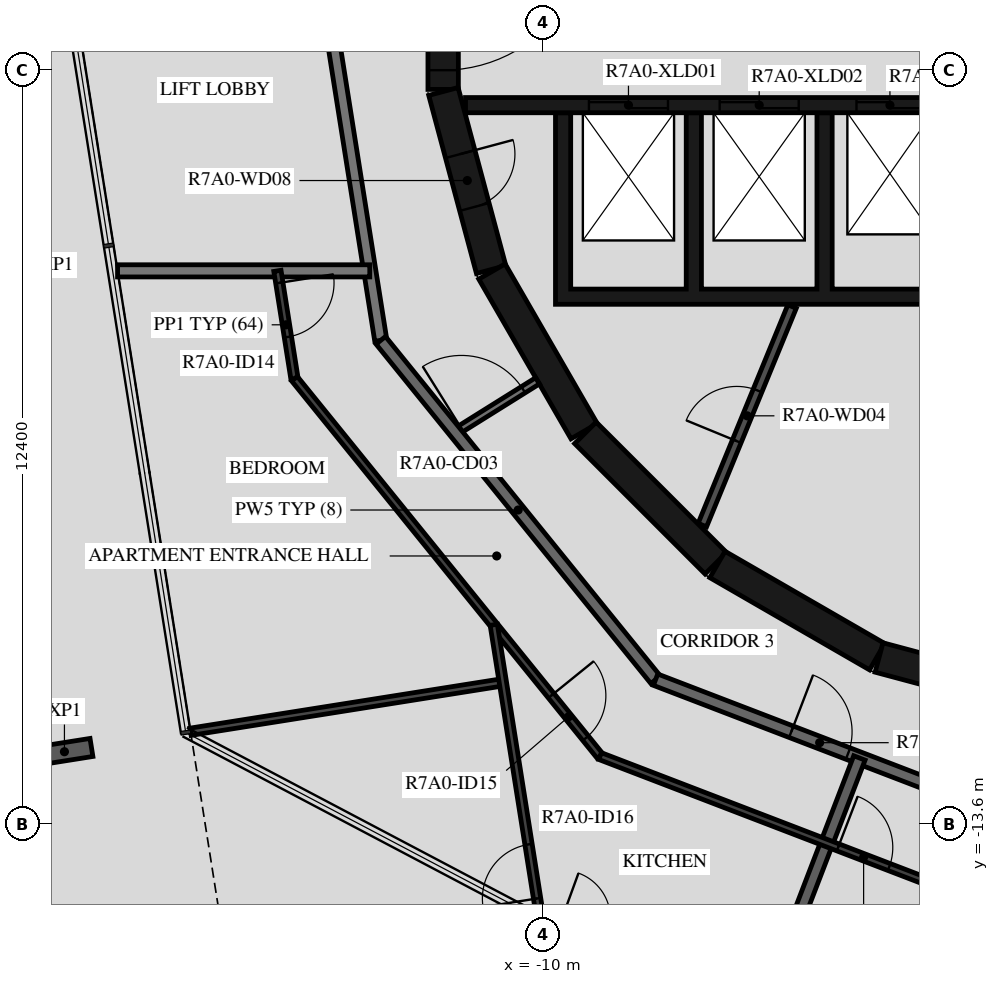
"""IFC4 building model, lengths in metres.
Left out: names, types, materials, properties, quantities, classifications, styles, units other than length and angle.
Written with IfcOpenShell. Run it as: python <this file> out.ifc"""

import sys

from ifc_helpers import new_model, si_unit, direction, frame, frame_2d, origin, origin_2d, place, context, subcontext, project, spatial, polyline, rectangle, i_section, outline, extrude, element, fill, save


model = new_model("IFC4")
c1 = context("Model", 3, precision=1e-05, world=origin(), true_north=direction((0.0, 1.0)))
c2 = subcontext(c1, "Body", "Model", "MODEL_VIEW")
j1 = project(units=[si_unit("LENGTHUNIT", "METRE"), si_unit("PLANEANGLEUNIT", "RADIAN")], contexts=[c1])
p1 = place(None, origin())
s1 = spatial("IfcSite", under=j1, at=p1, CompositionType="ELEMENT")
p2 = place(p1, origin())
s2 = spatial("IfcBuilding", under=s1, at=p2, CompositionType="ELEMENT")
p3 = place(p2, frame((0.0, 0.0, 263.4)))
s3 = spatial("IfcBuildingStorey", under=s2, at=p3, CompositionType="ELEMENT", Elevation=263.4)
p4 = place(p3, frame((-17.875, -12.408, -0.45), z_axis=(0.0, 0.0, 1.0), x_axis=(-0.156434064006, 0.987688404113, 0.0)))
e1 = element("IfcColumn", 1, at=p4, inside=s3, PredefinedType="COLUMN", context=c2, shape_type="SweptSolid", body=[
    extrude(i_section(OverallWidth=0.3, OverallDepth=0.9, WebThickness=0.019, FlangeThickness=0.035, FilletRadius=0.03, at=origin_2d()), origin(), (0.0, 0.0, 1.0), 3.57),
])
p5 = place(p3, frame((24.757, -7.212, 0.03), z_axis=(0.0, 0.0, 1.0), x_axis=(-0.843392095095, -0.537298589177, 0.0)))
e2 = element("IfcWall", 2, at=p5, inside=s3, PredefinedType="PARAPET", context=c2, shape_type="SweptSolid", body=[
    extrude(rectangle(XDim=34.009, YDim=0.2, at=frame_2d((17.004, 0.0))), origin(), (0.0, 0.0, 1.0), 1.5),
])
p6 = place(p3, frame((-11.647, 1.516, 0.0), z_axis=(0.0, 0.0, 1.0), x_axis=(0.0, -1.0, 0.0)))
e3 = element("IfcWall", 3, at=p6, inside=s3, PredefinedType="SHEAR", context=c2, shape_type="SweptSolid", body=[
    extrude(rectangle(XDim=3.033, YDim=0.5, at=frame_2d((1.516, 0.0))), origin(), (0.0, 0.0, 1.0), 3.12),
])
p7 = place(p6, frame((0.316, 0.0, 0.0)))
e4 = element("IfcOpeningElement", 4, at=p7, cuts=e3, PredefinedType="OPENING", context=c2, shape_type="SweptSolid", body=[
    extrude(rectangle(XDim=2.4, YDim=2.1, at=frame_2d((1.2, 1.05))), frame((0.0, 0.26, 0.0), z_axis=(0.0, -1.0, 0.0), x_axis=(1.0, 0.0, 0.0)), (0.0, 0.0, 1.0), 0.52),
])
p8 = place(p3, frame((-11.643, -1.55, 0.0), z_axis=(0.0, 0.0, 1.0), x_axis=(0.258734743916, -0.965948410781, 0.0)))
e5 = element("IfcWall", 5, at=p8, inside=s3, PredefinedType="SHEAR", context=c2, shape_type="SweptSolid", body=[
    extrude(rectangle(XDim=3.033, YDim=0.5, at=frame_2d((1.516, 0.0))), origin(), (0.0, 0.0, 1.0), 3.12),
])
p9 = place(p8, frame((1.066, 0.0, 0.0)))
e6 = element("IfcOpeningElement", 6, at=p9, cuts=e5, PredefinedType="OPENING", context=c2, shape_type="SweptSolid", body=[
    extrude(rectangle(XDim=0.9, YDim=2.1, at=frame_2d((0.45, 1.05))), frame((0.0, 0.26, 0.0), z_axis=(0.0, -1.0, 0.0), x_axis=(1.0, 0.0, 0.0)), (0.0, 0.0, 1.0), 0.52),
])
p10 = place(p3, frame((-10.845, -4.51, 0.0), z_axis=(0.0, 0.0, 1.0), x_axis=(0.500087131594, -0.865975092491, 0.0)))
e7 = element("IfcWall", 7, at=p10, inside=s3, PredefinedType="SHEAR", context=c2, shape_type="SweptSolid", body=[
    extrude(rectangle(XDim=3.033, YDim=0.5, at=frame_2d((1.516, 0.0))), origin(), (0.0, 0.0, 1.0), 3.12),
])
p11 = place(p3, frame((-9.308, -7.164, 0.0), z_axis=(0.0, 0.0, 1.0), x_axis=(0.707106781187, -0.707106781187, 0.0)))
e8 = element("IfcWall", 8, at=p11, inside=s3, PredefinedType="SHEAR", context=c2, shape_type="SweptSolid", body=[
    extrude(rectangle(XDim=3.032, YDim=0.5, at=frame_2d((1.516, 0.0))), origin(), (0.0, 0.0, 1.0), 3.12),
])
for number, where, z_axis, x_axis in (
    (9, (-7.137, -9.329, 0.0), (0.0, 0.0, 1.0), (0.866, -0.5, 0.0)),
    (10, (-4.479, -10.858, 0.0), (0.0, 0.0, 1.0), (0.966, -0.259, 0.0)),
):
    element("IfcWall", number, at=place(p3, frame(where, z_axis=z_axis, x_axis=x_axis)), inside=s3, PredefinedType="SHEAR", context=c2, shape_type="SweptSolid", body=[
        extrude(rectangle(XDim=3.033, YDim=0.5, at=frame_2d((1.516, 0.0))), origin(), (0.0, 0.0, 1.0), 3.12),
    ])
p12 = place(p3, origin())
e11 = element("IfcWall", 11, at=p12, inside=s3, PredefinedType="SHEAR", context=c2, shape_type="SweptSolid", body=[
    extrude(outline(polyline([(9.8, -5.05), (9.8, -4.8), (9.8, -1.9), (9.55, -1.9), (9.55, -4.8), (7.65, -4.8), (7.65, -1.9), (7.4, -1.9), (7.4, -4.8), (5.5, -4.8), (5.5, -1.9), (5.25, -1.9), (5.25, -4.8), (3.35, -4.8), (3.35, -1.9), (3.1, -1.9), (3.1, -4.8), (1.2, -4.8), (1.2, -1.9), (0.95, -1.9), (0.95, -4.8), (-0.95, -4.8), (-0.95, -1.9), (-1.2, -1.9), (-1.2, -4.8), (-3.1, -4.8), (-3.1, -1.9), (-3.35, -1.9), (-3.35, -4.8), (-5.25, -4.8), (-5.25, -1.9), (-5.5, -1.9), (-5.5, -4.8), (-7.4, -4.8), (-7.4, -1.9), (-7.65, -1.9), (-7.65, -4.8), (-9.55, -4.8), (-9.55, -1.9), (-9.8, -1.9), (-9.8, -4.8), (-9.8, -5.05), (9.8, -5.05)])), origin(), (0.0, 0.0, 1.0), 3.12),
])
p13 = place(p3, frame((-11.28, -1.775, 0.0), z_axis=(0.0, 0.0, 1.0), x_axis=(1.0, 0.0, 0.0)))
e12 = element("IfcWall", 12, at=p13, inside=s3, PredefinedType="SHEAR", context=c2, shape_type="SweptSolid", body=[
    extrude(rectangle(XDim=14.38, YDim=0.25, at=frame_2d((7.19, 0.0))), origin(), (0.0, 0.0, 1.0), 3.12),
])
p14 = place(p13, frame((2.03, 0.0, 0.0)))
e13 = element("IfcOpeningElement", 13, at=p14, cuts=e12, PredefinedType="OPENING", context=c2, shape_type="SweptSolid", body=[
    extrude(rectangle(XDim=1.3, YDim=2.1, at=frame_2d((0.65, 1.05))), frame((0.0, 0.135, 0.0), z_axis=(0.0, -1.0, 0.0), x_axis=(1.0, 0.0, 0.0)), (0.0, 0.0, 1.0), 0.27),
])
p15 = place(p13, frame((4.18, 0.0, 0.0)))
e14 = element("IfcOpeningElement", 14, at=p15, cuts=e12, PredefinedType="OPENING", context=c2, shape_type="SweptSolid", body=[
    extrude(rectangle(XDim=1.3, YDim=2.1, at=frame_2d((0.65, 1.05))), frame((0.0, 0.135, 0.0), z_axis=(0.0, -1.0, 0.0), x_axis=(1.0, 0.0, 0.0)), (0.0, 0.0, 1.0), 0.27),
])
p16 = place(p13, frame((6.43, 0.0, 0.0)))
e15 = element("IfcOpeningElement", 15, at=p16, cuts=e12, PredefinedType="OPENING", context=c2, shape_type="SweptSolid", body=[
    extrude(rectangle(XDim=1.1, YDim=2.1, at=frame_2d((0.55, 1.05))), frame((0.0, 0.135, 0.0), z_axis=(0.0, -1.0, 0.0), x_axis=(1.0, 0.0, 0.0)), (0.0, 0.0, 1.0), 0.27),
])
p17 = place(p13, frame((8.58, 0.0, 0.0)))
e16 = element("IfcOpeningElement", 16, at=p17, cuts=e12, PredefinedType="OPENING", context=c2, shape_type="SweptSolid", body=[
    extrude(rectangle(XDim=1.1, YDim=2.1, at=frame_2d((0.55, 1.05))), frame((0.0, 0.135, 0.0), z_axis=(0.0, -1.0, 0.0), x_axis=(1.0, 0.0, 0.0)), (0.0, 0.0, 1.0), 0.27),
])
p18 = place(p13, frame((10.73, 0.0, 0.0)))
e17 = element("IfcOpeningElement", 17, at=p18, cuts=e12, PredefinedType="OPENING", context=c2, shape_type="SweptSolid", body=[
    extrude(rectangle(XDim=1.1, YDim=2.1, at=frame_2d((0.55, 1.05))), frame((0.0, 0.135, 0.0), z_axis=(0.0, -1.0, 0.0), x_axis=(1.0, 0.0, 0.0)), (0.0, 0.0, 1.0), 0.27),
])
p19 = place(p13, frame((12.98, 0.0, 0.0)))
e18 = element("IfcOpeningElement", 18, at=p19, cuts=e12, PredefinedType="OPENING", context=c2, shape_type="SweptSolid", body=[
    extrude(rectangle(XDim=0.9, YDim=2.1, at=frame_2d((0.45, 1.05))), frame((0.0, 0.135, 0.0), z_axis=(0.0, -1.0, 0.0), x_axis=(1.0, 0.0, 0.0)), (0.0, 0.0, 1.0), 0.27),
])
p20 = place(p3, frame((-7.385, -8.681, 0.0), z_axis=(0.0, 0.0, 1.0), x_axis=(0.379804590409, 0.925066739811, 0.0)))
e19 = element("IfcWall", 19, at=p20, inside=s3, PredefinedType="PARTITIONING", context=c2, shape_type="SweptSolid", body=[
    extrude(rectangle(XDim=3.885, YDim=0.15, at=frame_2d((1.942, 0.0))), origin(), (0.0, 0.0, 1.0), 3.12),
])
p21 = place(p20, frame((1.493, 0.0, 0.0)))
e20 = element("IfcOpeningElement", 20, at=p21, cuts=e19, PredefinedType="OPENING", context=c2, shape_type="SweptSolid", body=[
    extrude(rectangle(XDim=0.9, YDim=2.1, at=frame_2d((0.45, 1.05))), frame((0.0, 0.085, 0.0), z_axis=(0.0, -1.0, 0.0), x_axis=(1.0, 0.0, 0.0)), (0.0, 0.0, 1.0), 0.17),
])
p22 = place(p3, frame((-11.449, -7.154, 0.0), z_axis=(0.0, 0.0, 1.0), x_axis=(0.848067047543, 0.529888934468, 0.0)))
e21 = element("IfcWall", 21, at=p22, inside=s3, PredefinedType="PARTITIONING", context=c2, shape_type="SweptSolid", body=[
    extrude(rectangle(XDim=1.596, YDim=0.12, at=frame_2d((0.798, 0.0))), origin(), (0.0, 0.0, 1.0), 3.12),
])
p23 = place(p22, frame((0.12, 0.0, 0.0)))
e22 = element("IfcOpeningElement", 22, at=p23, cuts=e21, PredefinedType="OPENING", context=c2, shape_type="SweptSolid", body=[
    extrude(rectangle(XDim=1.2, YDim=2.1, at=frame_2d((0.6, 1.05))), frame((0.0, 0.07, 0.0), z_axis=(0.0, -1.0, 0.0), x_axis=(1.0, 0.0, 0.0)), (0.0, 0.0, 1.0), 0.14),
])
p24 = place(p3, frame((-13.797, 1.45, 0.0), z_axis=(0.0, 0.0, 1.0), x_axis=(0.156421704315, -0.987690361611, 0.0)))
e23 = element("IfcWall", 23, at=p24, inside=s3, PredefinedType="STANDARD", context=c2, shape_type="SweptSolid", body=[
    extrude(rectangle(XDim=7.181, YDim=0.2, at=frame_2d((3.591, 0.0))), origin(), (0.0, 0.0, 1.0), 3.12),
])
p25 = place(p3, frame((-12.673, -5.643, 0.0), z_axis=(0.0, 0.0, 1.0), x_axis=(0.629302871585, -0.777160148113, 0.0)))
e24 = element("IfcWall", 24, at=p25, inside=s3, PredefinedType="STANDARD", context=c2, shape_type="SweptSolid", body=[
    extrude(rectangle(XDim=7.181, YDim=0.2, at=frame_2d((3.59, 0.0))), origin(), (0.0, 0.0, 1.0), 3.12),
])
p26 = place(p3, frame((-8.154, -11.223, 0.0), z_axis=(0.0, 0.0, 1.0), x_axis=(0.93359073609, -0.358341090983, 0.0)))
e25 = element("IfcWall", 25, at=p26, inside=s3, PredefinedType="STANDARD", context=c2, shape_type="SweptSolid", body=[
    extrude(rectangle(XDim=7.181, YDim=0.2, at=frame_2d((3.59, 0.0))), origin(), (0.0, 0.0, 1.0), 3.12),
])
p27 = place(p26, frame((2.39, 0.0, 0.0)))
e26 = element("IfcOpeningElement", 26, at=p27, cuts=e25, PredefinedType="OPENING", context=c2, shape_type="SweptSolid", body=[
    extrude(rectangle(XDim=1.0, YDim=2.1, at=frame_2d((0.5, 1.05))), frame((0.0, 0.11, 0.0), z_axis=(0.0, -1.0, 0.0), x_axis=(1.0, 0.0, 0.0)), (0.0, 0.0, 1.0), 0.22),
])
p28 = place(p3, frame((-17.002, -4.5, 0.0), z_axis=(0.0, 0.0, 1.0), x_axis=(1.0, 0.0, 0.0)))
e27 = element("IfcWall", 27, at=p28, inside=s3, PredefinedType="STANDARD", context=c2, shape_type="SweptSolid", body=[
    extrude(rectangle(XDim=4.148, YDim=0.2, at=frame_2d((2.074, 0.0))), origin(), (0.0, 0.0, 1.0), 3.12),
])
p29 = place(p3, frame((-6.25, -16.282, 0.0), z_axis=(0.0, 0.0, 1.0), x_axis=(0.358351333512, 0.933586804625, 0.0)))
e28 = element("IfcWall", 28, at=p29, inside=s3, PredefinedType="STANDARD", context=c2, shape_type="SweptSolid", body=[
    extrude(rectangle(XDim=4.04, YDim=0.2, at=frame_2d((2.02, 0.0))), origin(), (0.0, 0.0, 1.0), 3.12),
])
p30 = place(p3, frame((-14.373, -4.5, 0.0), z_axis=(0.0, 0.0, 1.0), x_axis=(0.156437152886, -0.987687914878, 0.0)))
e29 = element("IfcWall", 29, at=p30, inside=s3, PredefinedType="PARTITIONING", context=c2, shape_type="SweptSolid", body=[
    extrude(rectangle(XDim=1.796, YDim=0.12, at=frame_2d((0.898, 0.0))), origin(), (0.0, 0.0, 1.0), 3.12),
])
p31 = place(p30, frame((0.2, 0.0, 0.0)))
e30 = element("IfcOpeningElement", 30, at=p31, cuts=e29, PredefinedType="OPENING", context=c2, shape_type="SweptSolid", body=[
    extrude(rectangle(XDim=0.9, YDim=2.1, at=frame_2d((0.45, 1.05))), frame((0.0, 0.07, 0.0), z_axis=(0.0, -1.0, 0.0), x_axis=(1.0, 0.0, 0.0)), (0.0, 0.0, 1.0), 0.14),
])
p32 = place(p3, frame((-14.092, -6.274, 0.0), z_axis=(0.0, 0.0, 1.0), x_axis=(0.62933367237, -0.777135206268, 0.0)))
e31 = element("IfcWall", 31, at=p32, inside=s3, PredefinedType="PARTITIONING", context=c2, shape_type="SweptSolid", body=[
    extrude(rectangle(XDim=7.985, YDim=0.12, at=frame_2d((3.992, 0.0))), origin(), (0.0, 0.0, 1.0), 3.12),
])
p33 = place(p32, frame((6.707, 0.0, 0.0)))
e32 = element("IfcOpeningElement", 32, at=p33, cuts=e31, PredefinedType="OPENING", context=c2, shape_type="SweptSolid", body=[
    extrude(rectangle(XDim=0.9, YDim=2.1, at=frame_2d((0.45, 1.05))), frame((0.0, 0.07, 0.0), z_axis=(0.0, -1.0, 0.0), x_axis=(1.0, 0.0, 0.0)), (0.0, 0.0, 1.0), 0.14),
])
p34 = place(p3, frame((-9.067, -12.479, 0.0), z_axis=(0.0, 0.0, 1.0), x_axis=(0.933579449035, -0.358370495911, 0.0)))
e33 = element("IfcWall", 33, at=p34, inside=s3, PredefinedType="PARTITIONING", context=c2, shape_type="SweptSolid", body=[
    extrude(rectangle(XDim=7.985, YDim=0.12, at=frame_2d((3.992, 0.0))), origin(), (0.0, 0.0, 1.0), 3.12),
])
p35 = place(p34, frame((4.192, 0.0, 0.0)))
e34 = element("IfcOpeningElement", 34, at=p35, cuts=e33, PredefinedType="OPENING", context=c2, shape_type="SweptSolid", body=[
    extrude(rectangle(XDim=0.9, YDim=2.1, at=frame_2d((0.45, 1.05))), frame((0.0, 0.07, 0.0), z_axis=(0.0, -1.0, 0.0), x_axis=(1.0, 0.0, 0.0)), (0.0, 0.0, 1.0), 0.14),
])
p36 = place(p3, frame((-15.802, -12.08, 0.0), z_axis=(0.0, 0.0, 1.0), x_axis=(0.987687857978, 0.156437512135, 0.0)))
e35 = element("IfcWall", 35, at=p36, inside=s3, PredefinedType="PARTITIONING", context=c2, shape_type="SweptSolid", body=[
    extrude(rectangle(XDim=5.2, YDim=0.12, at=frame_2d((2.6, 0.0))), origin(), (0.0, 0.0, 1.0), 2.73),
])
p37 = place(p3, frame((-9.619, -17.871, 0.0), z_axis=(0.0, 0.0, 1.0), x_axis=(-0.156433255633, 0.987688532146, 0.0)))
e36 = element("IfcWall", 36, at=p37, inside=s3, PredefinedType="PARTITIONING", context=c2, shape_type="SweptSolid", body=[
    extrude(rectangle(XDim=7.644, YDim=0.12, at=frame_2d((3.822, 0.0))), origin(), (0.0, 0.0, 1.0), 3.12),
])
p38 = place(p37, frame((3.087, 0.0, 0.0)))
e37 = element("IfcOpeningElement", 37, at=p38, cuts=e36, PredefinedType="OPENING", context=c2, shape_type="SweptSolid", body=[
    extrude(rectangle(XDim=0.9, YDim=2.1, at=frame_2d((0.45, 1.05))), frame((0.0, 0.07, 0.0), z_axis=(0.0, -1.0, 0.0), x_axis=(1.0, 0.0, 0.0)), (0.0, 0.0, 1.0), 0.14),
])
p39 = place(p3, frame((-3.875, -21.019, 0.0), z_axis=(0.0, 0.0, 1.0), x_axis=(0.777149096542, 0.629316519523, 0.0)))
e38 = element("IfcWall", 38, at=p39, inside=s3, PredefinedType="PARTITIONING", context=c2, shape_type="SweptSolid", body=[
    extrude(rectangle(XDim=10.508, YDim=0.12, at=frame_2d((5.254, 0.0))), origin(), (0.0, 0.0, 1.0), 3.12),
])
p40 = place(p39, frame((1.23, 0.0, 0.0)))
e39 = element("IfcOpeningElement", 39, at=p40, cuts=e38, PredefinedType="OPENING", context=c2, shape_type="SweptSolid", body=[
    extrude(rectangle(XDim=0.9, YDim=2.1, at=frame_2d((0.45, 1.05))), frame((0.0, 0.07, 0.0), z_axis=(0.0, -1.0, 0.0), x_axis=(1.0, 0.0, 0.0)), (0.0, 0.0, 1.0), 0.14),
])
p41 = place(p7, origin())
e40 = element("IfcDoor", 40, at=p41, inside=s3, OperationType="DOUBLE_DOOR_SINGLE_SWING", PredefinedType="DOOR", context=c2, shape_type="SweptSolid", body=[
    extrude(rectangle(XDim=2.4, YDim=2.1, at=frame_2d((1.2, 1.05))), frame((0.0, 0.025, 0.0), z_axis=(0.0, -1.0, 0.0), x_axis=(1.0, 0.0, 0.0)), (0.0, 0.0, 1.0), 0.05),
])
fill(e4, e40)
p42 = place(p14, origin())
e41 = element("IfcDoor", 41, at=p42, inside=s3, OperationType="DOUBLE_DOOR_SLIDING", PredefinedType="DOOR", context=c2, shape_type="SweptSolid", body=[
    extrude(rectangle(XDim=1.3, YDim=2.1, at=frame_2d((0.65, 1.05))), frame((0.0, 0.025, 0.0), z_axis=(0.0, -1.0, 0.0), x_axis=(1.0, 0.0, 0.0)), (0.0, 0.0, 1.0), 0.05),
])
fill(e13, e41)
p43 = place(p15, origin())
e42 = element("IfcDoor", 42, at=p43, inside=s3, OperationType="DOUBLE_DOOR_SLIDING", PredefinedType="DOOR", context=c2, shape_type="SweptSolid", body=[
    extrude(rectangle(XDim=1.3, YDim=2.1, at=frame_2d((0.65, 1.05))), frame((0.0, 0.025, 0.0), z_axis=(0.0, -1.0, 0.0), x_axis=(1.0, 0.0, 0.0)), (0.0, 0.0, 1.0), 0.05),
])
fill(e14, e42)
p44 = place(p16, origin())
e43 = element("IfcDoor", 43, at=p44, inside=s3, OperationType="DOUBLE_DOOR_SLIDING", PredefinedType="DOOR", context=c2, shape_type="SweptSolid", body=[
    extrude(rectangle(XDim=1.1, YDim=2.1, at=frame_2d((0.55, 1.05))), frame((0.0, 0.025, 0.0), z_axis=(0.0, -1.0, 0.0), x_axis=(1.0, 0.0, 0.0)), (0.0, 0.0, 1.0), 0.05),
])
fill(e15, e43)
p45 = place(p21, origin())
e44 = element("IfcDoor", 44, at=p45, inside=s3, OperationType="SINGLE_SWING_RIGHT", PredefinedType="DOOR", context=c2, shape_type="SweptSolid", body=[
    extrude(rectangle(XDim=0.9, YDim=2.1, at=frame_2d((0.45, 1.05))), frame((0.0, 0.025, 0.0), z_axis=(0.0, -1.0, 0.0), x_axis=(1.0, 0.0, 0.0)), (0.0, 0.0, 1.0), 0.05),
])
fill(e20, e44)
p46 = place(p9, origin())
e45 = element("IfcDoor", 45, at=p46, inside=s3, OperationType="SINGLE_SWING_RIGHT", PredefinedType="DOOR", context=c2, shape_type="SweptSolid", body=[
    extrude(rectangle(XDim=0.9, YDim=2.1, at=frame_2d((0.45, 1.05))), frame((0.0, 0.025, 0.0), z_axis=(0.0, -1.0, 0.0), x_axis=(1.0, 0.0, 0.0)), (0.0, 0.0, 1.0), 0.05),
])
fill(e6, e45)
p47 = place(p27, origin())
e46 = element("IfcDoor", 46, at=p47, inside=s3, OperationType="SINGLE_SWING_RIGHT", PredefinedType="DOOR", context=c2, shape_type="SweptSolid", body=[
    extrude(rectangle(XDim=1.0, YDim=2.1, at=frame_2d((0.5, 1.05))), frame((0.0, 0.025, 0.0), z_axis=(0.0, -1.0, 0.0), x_axis=(1.0, 0.0, 0.0)), (0.0, 0.0, 1.0), 0.05),
])
fill(e26, e46)
p48 = place(p31, origin())
e47 = element("IfcDoor", 47, at=p48, inside=s3, OperationType="SINGLE_SWING_RIGHT", PredefinedType="DOOR", context=c2, shape_type="SweptSolid", body=[
    extrude(rectangle(XDim=0.9, YDim=2.1, at=frame_2d((0.45, 1.05))), frame((0.0, 0.025, 0.0), z_axis=(0.0, -1.0, 0.0), x_axis=(1.0, 0.0, 0.0)), (0.0, 0.0, 1.0), 0.05),
])
fill(e30, e47)
p49 = place(p33, origin())
e48 = element("IfcDoor", 48, at=p49, inside=s3, OperationType="SINGLE_SWING_RIGHT", PredefinedType="DOOR", context=c2, shape_type="SweptSolid", body=[
    extrude(rectangle(XDim=0.9, YDim=2.1, at=frame_2d((0.45, 1.05))), frame((0.0, 0.025, 0.0), z_axis=(0.0, -1.0, 0.0), x_axis=(1.0, 0.0, 0.0)), (0.0, 0.0, 1.0), 0.05),
])
fill(e32, e48)
p50 = place(p38, origin())
e49 = element("IfcDoor", 49, at=p50, inside=s3, OperationType="SINGLE_SWING_RIGHT", PredefinedType="DOOR", context=c2, shape_type="SweptSolid", body=[
    extrude(rectangle(XDim=0.9, YDim=2.1, at=frame_2d((0.45, 1.05))), frame((0.0, 0.025, 0.0), z_axis=(0.0, -1.0, 0.0), x_axis=(1.0, 0.0, 0.0)), (0.0, 0.0, 1.0), 0.05),
])
fill(e37, e49)
p51 = place(p35, origin())
e50 = element("IfcDoor", 50, at=p51, inside=s3, OperationType="SINGLE_SWING_RIGHT", PredefinedType="DOOR", context=c2, shape_type="SweptSolid", body=[
    extrude(rectangle(XDim=0.9, YDim=2.1, at=frame_2d((0.45, 1.05))), frame((0.0, 0.025, 0.0), z_axis=(0.0, -1.0, 0.0), x_axis=(1.0, 0.0, 0.0)), (0.0, 0.0, 1.0), 0.05),
])
fill(e34, e50)
p52 = place(p23, origin())
e51 = element("IfcDoor", 51, at=p52, inside=s3, OperationType="DOUBLE_DOOR_SINGLE_SWING", PredefinedType="DOOR", context=c2, shape_type="SweptSolid", body=[
    extrude(rectangle(XDim=1.2, YDim=2.1, at=frame_2d((0.6, 1.05))), frame((0.0, 0.025, 0.0), z_axis=(0.0, -1.0, 0.0), x_axis=(1.0, 0.0, 0.0)), (0.0, 0.0, 1.0), 0.05),
])
fill(e22, e51)
save(model, sys.argv[1])
